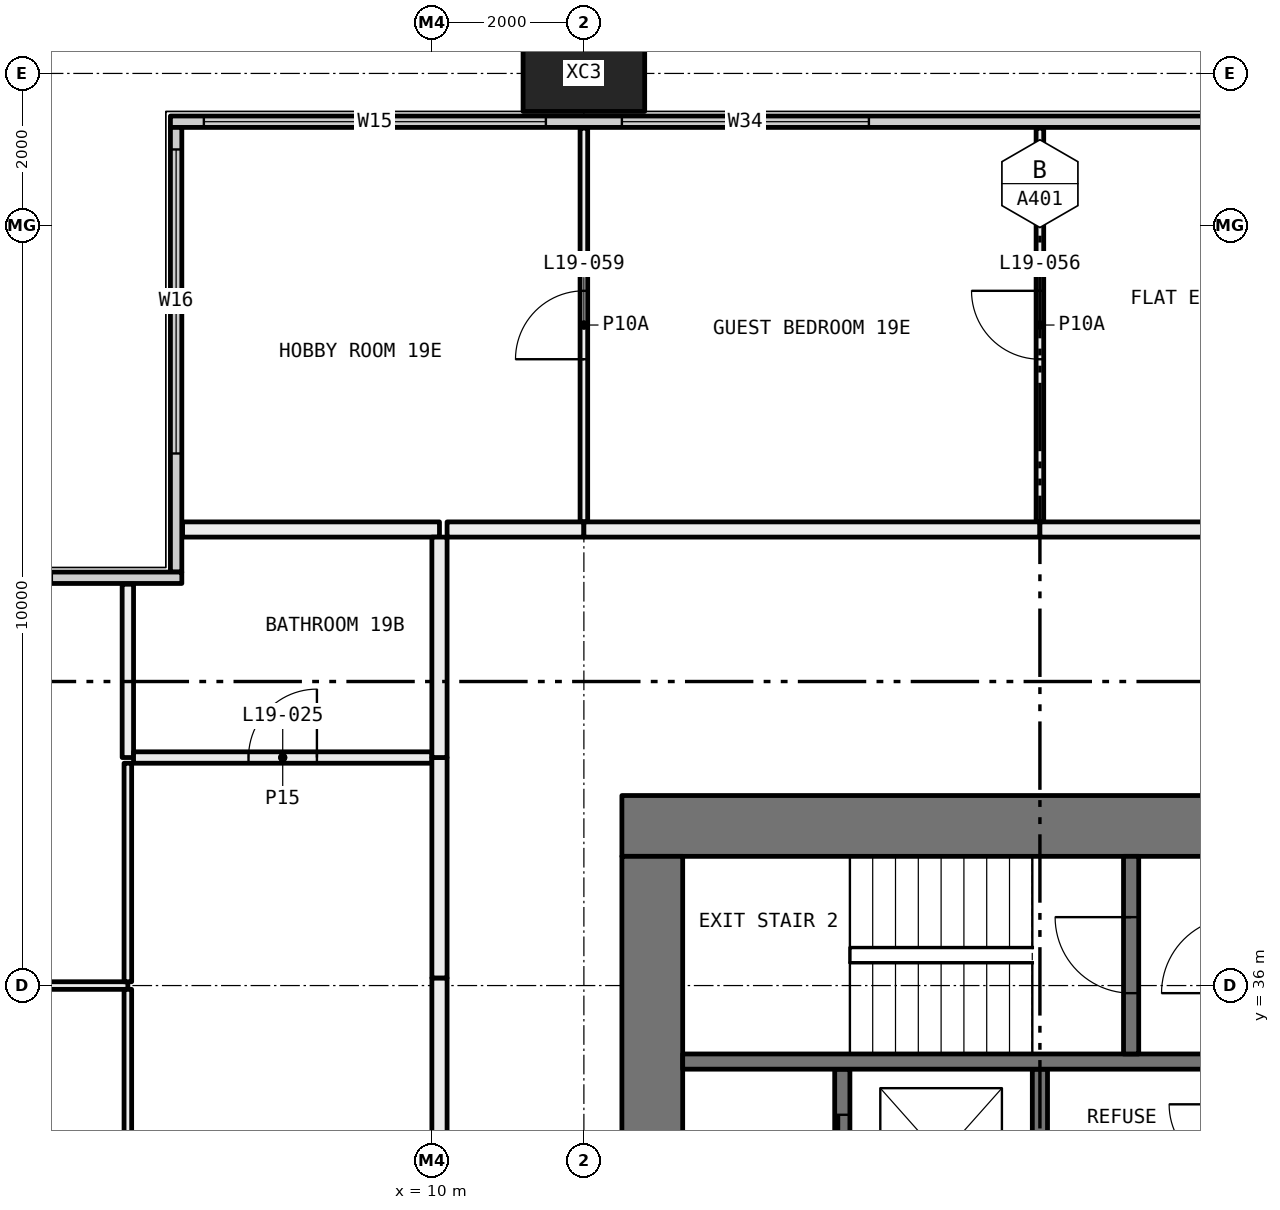
"""IFC4 building model, lengths in metres.
Left out: names, types, materials, properties, quantities, classifications, styles, units other than length and angle.
Written with IfcOpenShell. Run it as: python <this file> out.ifc"""

import sys

from ifc_helpers import new_model, si_unit, direction, frame, frame_2d, origin, origin_2d, place, context, subcontext, project, spatial, rectangle, hollow_rectangle, extrude, element, fill, save


model = new_model("IFC4")
c1 = context("Model", 3, precision=1e-05, world=origin(), true_north=direction((0.0, 1.0)))
c2 = subcontext(c1, "Body", "Model", "MODEL_VIEW")
j1 = project(units=[si_unit("LENGTHUNIT", "METRE"), si_unit("PLANEANGLEUNIT", "RADIAN")], contexts=[c1])
p1 = place(None, origin())
s1 = spatial("IfcSite", under=j1, at=p1, CompositionType="ELEMENT")
p2 = place(p1, origin())
s2 = spatial("IfcBuilding", under=s1, at=p2, CompositionType="ELEMENT")
p3 = place(p2, frame((0.0, 0.0, 78.3)))
s3 = spatial("IfcBuildingStorey", under=s2, at=p3, CompositionType="ELEMENT", Elevation=78.3)
p4 = place(p3, frame((12.0, 48.0, -0.4), z_axis=(0.0, 0.0, 1.0), x_axis=(1.0, 0.0, 0.0)))
e1 = element("IfcColumn", 1, at=p4, inside=s3, PredefinedType="COLUMN", context=c2, shape_type="SweptSolid", body=[
    extrude(hollow_rectangle(XDim=1.6, YDim=1.0, WallThickness=0.065, at=origin_2d()), origin(), (0.0, 0.0, 1.0), 3.45),
])
p5 = place(p3, frame((6.56, 47.365, 0.0), z_axis=(0.0, 0.0, 1.0), x_axis=(1.0, 0.0, 0.0)))
e2 = element("IfcWall", 2, at=p5, inside=s3, PredefinedType="ELEMENTEDWALL", context=c2, shape_type="SweptSolid", body=[
    extrude(rectangle(XDim=58.88, YDim=0.15, at=frame_2d((29.44, 0.0))), origin(), (0.0, 0.0, 1.0), 3.05),
])
p6 = place(p5, frame((0.44, 0.0, 0.45)))
e3 = element("IfcOpeningElement", 3, at=p6, cuts=e2, PredefinedType="OPENING", context=c2, shape_type="SweptSolid", body=[
    extrude(rectangle(XDim=4.5, YDim=2.55, at=frame_2d((2.25, 1.275))), frame((0.0, 0.085, 0.0), z_axis=(0.0, -1.0, 0.0), x_axis=(1.0, 0.0, 0.0)), (0.0, 0.0, 1.0), 0.17),
])
p7 = place(p5, frame((5.94, 0.0, 0.45)))
e4 = element("IfcOpeningElement", 4, at=p7, cuts=e2, PredefinedType="OPENING", context=c2, shape_type="SweptSolid", body=[
    extrude(rectangle(XDim=3.25, YDim=2.55, at=frame_2d((1.625, 1.275))), frame((0.0, 0.085, 0.0), z_axis=(0.0, -1.0, 0.0), x_axis=(1.0, 0.0, 0.0)), (0.0, 0.0, 1.0), 0.17),
])
p8 = place(p5, frame((13.69, 0.0, 0.45)))
e5 = element("IfcOpeningElement", 5, at=p8, cuts=e2, PredefinedType="OPENING", context=c2, shape_type="SweptSolid", body=[
    extrude(rectangle(XDim=3.25, YDim=2.55, at=frame_2d((1.625, 1.275))), frame((0.0, 0.085, 0.0), z_axis=(0.0, -1.0, 0.0), x_axis=(1.0, 0.0, 0.0)), (0.0, 0.0, 1.0), 0.17),
])
p9 = place(p5, frame((17.94, 0.0, 0.45)))
e6 = element("IfcOpeningElement", 6, at=p9, cuts=e2, PredefinedType="OPENING", context=c2, shape_type="SweptSolid", body=[
    extrude(rectangle(XDim=3.25, YDim=2.55, at=frame_2d((1.625, 1.275))), frame((0.0, 0.085, 0.0), z_axis=(0.0, -1.0, 0.0), x_axis=(1.0, 0.0, 0.0)), (0.0, 0.0, 1.0), 0.17),
])
p10 = place(p5, frame((26.94, 0.0, 0.45)))
e7 = element("IfcOpeningElement", 7, at=p10, cuts=e2, PredefinedType="OPENING", context=c2, shape_type="SweptSolid", body=[
    extrude(rectangle(XDim=2.0, YDim=2.55, at=frame_2d((1.0, 1.275))), frame((0.0, 0.085, 0.0), z_axis=(0.0, -1.0, 0.0), x_axis=(1.0, 0.0, 0.0)), (0.0, 0.0, 1.0), 0.17),
])
p11 = place(p5, frame((29.94, 0.0, 0.45)))
e8 = element("IfcOpeningElement", 8, at=p11, cuts=e2, PredefinedType="OPENING", context=c2, shape_type="SweptSolid", body=[
    extrude(rectangle(XDim=3.25, YDim=2.55, at=frame_2d((1.625, 1.275))), frame((0.0, 0.085, 0.0), z_axis=(0.0, -1.0, 0.0), x_axis=(1.0, 0.0, 0.0)), (0.0, 0.0, 1.0), 0.17),
])
p12 = place(p5, frame((37.69, 0.0, 0.45)))
e9 = element("IfcOpeningElement", 9, at=p12, cuts=e2, PredefinedType="OPENING", context=c2, shape_type="SweptSolid", body=[
    extrude(rectangle(XDim=3.25, YDim=2.55, at=frame_2d((1.625, 1.275))), frame((0.0, 0.085, 0.0), z_axis=(0.0, -1.0, 0.0), x_axis=(1.0, 0.0, 0.0)), (0.0, 0.0, 1.0), 0.17),
])
p13 = place(p5, frame((41.94, 0.0, 0.45)))
e10 = element("IfcOpeningElement", 10, at=p13, cuts=e2, PredefinedType="OPENING", context=c2, shape_type="SweptSolid", body=[
    extrude(rectangle(XDim=3.25, YDim=2.55, at=frame_2d((1.625, 1.275))), frame((0.0, 0.085, 0.0), z_axis=(0.0, -1.0, 0.0), x_axis=(1.0, 0.0, 0.0)), (0.0, 0.0, 1.0), 0.17),
])
p14 = place(p5, frame((50.94, 0.0, 0.45)))
e11 = element("IfcOpeningElement", 11, at=p14, cuts=e2, PredefinedType="OPENING", context=c2, shape_type="SweptSolid", body=[
    extrude(rectangle(XDim=2.0, YDim=2.55, at=frame_2d((1.0, 1.275))), frame((0.0, 0.085, 0.0), z_axis=(0.0, -1.0, 0.0), x_axis=(1.0, 0.0, 0.0)), (0.0, 0.0, 1.0), 0.17),
])
p15 = place(p5, frame((53.94, 0.0, 0.45)))
e12 = element("IfcOpeningElement", 12, at=p15, cuts=e2, PredefinedType="OPENING", context=c2, shape_type="SweptSolid", body=[
    extrude(rectangle(XDim=4.5, YDim=2.55, at=frame_2d((2.25, 1.275))), frame((0.0, 0.085, 0.0), z_axis=(0.0, -1.0, 0.0), x_axis=(1.0, 0.0, 0.0)), (0.0, 0.0, 1.0), 0.17),
])
p16 = place(p3, frame((6.635, 41.44, 0.0), z_axis=(0.0, 0.0, 1.0), x_axis=(0.0, 1.0, 0.0)))
e13 = element("IfcWall", 13, at=p16, inside=s3, PredefinedType="ELEMENTEDWALL", context=c2, shape_type="SweptSolid", body=[
    extrude(rectangle(XDim=5.85, YDim=0.15, at=frame_2d((2.925, 0.0))), origin(), (0.0, 0.0, 1.0), 3.05),
])
p17 = place(p16, frame((1.56, 0.0, 0.45)))
e14 = element("IfcOpeningElement", 14, at=p17, cuts=e13, PredefinedType="OPENING", context=c2, shape_type="SweptSolid", body=[
    extrude(rectangle(XDim=4.0, YDim=2.55, at=frame_2d((2.0, 1.275))), frame((0.0, 0.085, 0.0), z_axis=(0.0, -1.0, 0.0), x_axis=(1.0, 0.0, 0.0)), (0.0, 0.0, 1.0), 0.17),
])
p18 = place(p3, frame((0.56, 41.365, 0.0), z_axis=(0.0, 0.0, 1.0), x_axis=(1.0, 0.0, 0.0)))
e15 = element("IfcWall", 15, at=p18, inside=s3, PredefinedType="ELEMENTEDWALL", context=c2, shape_type="SweptSolid", body=[
    extrude(rectangle(XDim=6.15, YDim=0.15, at=frame_2d((3.075, 0.0))), origin(), (0.0, 0.0, 1.0), 3.05),
])
p19 = place(p18, frame((0.44, 0.0, 0.45)))
e16 = element("IfcOpeningElement", 16, at=p19, cuts=e15, PredefinedType="OPENING", context=c2, shape_type="SweptSolid", body=[
    extrude(rectangle(XDim=4.0, YDim=2.55, at=frame_2d((2.0, 1.275))), frame((0.0, 0.085, 0.0), z_axis=(0.0, -1.0, 0.0), x_axis=(1.0, 0.0, 0.0)), (0.0, 0.0, 1.0), 0.17),
])
p20 = place(p3, frame((6.0, 36.0, 0.0), z_axis=(0.0, 0.0, 1.0), x_axis=(-1.0, 0.0, 0.0)))
e17 = element("IfcWall", 17, at=p20, inside=s3, PredefinedType="PARTITIONING", context=c2, shape_type="SweptSolid", body=[
    extrude(rectangle(XDim=5.28, YDim=0.1, at=frame_2d((2.64, 0.0))), origin(), (0.0, 0.0, 1.0), 2.45),
])
p21 = place(p20, frame((2.19, 0.0, 0.0)))
e18 = element("IfcOpeningElement", 18, at=p21, cuts=e17, PredefinedType="OPENING", context=c2, shape_type="SweptSolid", body=[
    extrude(rectangle(XDim=0.9, YDim=2.1, at=frame_2d((0.45, 1.05))), frame((0.0, 0.06, 0.0), z_axis=(0.0, -1.0, 0.0), x_axis=(1.0, 0.0, 0.0)), (0.0, 0.0, 1.0), 0.12),
])
p22 = place(p3, frame((6.0, 25.5, 0.0), z_axis=(0.0, 0.0, 1.0), x_axis=(0.0, 1.0, 0.0)))
e19 = element("IfcWall", 19, at=p22, inside=s3, PredefinedType="PARTITIONING", context=c2, shape_type="SweptSolid", body=[
    extrude(rectangle(XDim=10.45, YDim=0.1, at=frame_2d((5.225, 0.0))), origin(), (0.0, 0.0, 1.0), 2.45),
])
p23 = place(p3, frame((6.0, 36.05, 0.0), z_axis=(0.0, 0.0, 1.0), x_axis=(0.0, 1.0, 0.0)))
e20 = element("IfcWall", 20, at=p23, inside=s3, PredefinedType="PARTITIONING", context=c2, shape_type="SweptSolid", body=[
    extrude(rectangle(XDim=2.875, YDim=0.1, at=frame_2d((1.438, 0.0))), origin(), (0.0, 0.0, 1.0), 2.45),
])
p24 = place(p3, frame((6.0, 39.0, 0.0), z_axis=(0.0, 0.0, 1.0), x_axis=(0.0, 1.0, 0.0)))
e21 = element("IfcWall", 21, at=p24, inside=s3, PredefinedType="PARTITIONING", context=c2, shape_type="SweptSolid", body=[
    extrude(rectangle(XDim=2.28, YDim=0.15, at=frame_2d((1.14, 0.0))), origin(), (0.0, 0.0, 1.0), 3.05),
])
p25 = place(p3, frame((10.0, 39.0, 0.0), z_axis=(0.0, 0.0, 1.0), x_axis=(-1.0, 0.0, 0.0)))
e22 = element("IfcWall", 22, at=p25, inside=s3, PredefinedType="PARTITIONING", context=c2, shape_type="SweptSolid", body=[
    extrude(rectangle(XDim=3.925, YDim=0.15, at=frame_2d((1.962, 0.0))), origin(), (0.0, 0.0, 1.0), 3.05),
])
p26 = place(p25, frame((1.512, 0.0, 0.0)))
e23 = element("IfcOpeningElement", 23, at=p26, cuts=e22, PredefinedType="OPENING", context=c2, shape_type="SweptSolid", body=[
    extrude(rectangle(XDim=0.9, YDim=2.1, at=frame_2d((0.45, 1.05))), frame((0.0, 0.085, 0.0), z_axis=(0.0, -1.0, 0.0), x_axis=(1.0, 0.0, 0.0)), (0.0, 0.0, 1.0), 0.17),
])
p27 = place(p3, frame((10.1, 25.5, 0.0), z_axis=(0.0, 0.0, 1.0), x_axis=(0.0, 1.0, 0.0)))
e24 = element("IfcWall", 24, at=p27, inside=s3, PredefinedType="PARTITIONING", context=c2, shape_type="SweptSolid", body=[
    extrude(rectangle(XDim=10.6, YDim=0.2, at=frame_2d((5.3, 0.0))), origin(), (0.0, 0.0, 1.0), 2.45),
])
p28 = place(p3, frame((10.1, 36.1, 0.0), z_axis=(0.0, 0.0, 1.0), x_axis=(0.0, 1.0, 0.0)))
e25 = element("IfcWall", 25, at=p28, inside=s3, PredefinedType="PARTITIONING", context=c2, shape_type="SweptSolid", body=[
    extrude(rectangle(XDim=2.9, YDim=0.2, at=frame_2d((1.45, 0.0))), origin(), (0.0, 0.0, 1.0), 3.05),
])
p29 = place(p3, frame((10.1, 42.0, 0.0), z_axis=(0.0, 0.0, 1.0), x_axis=(-1.0, 0.0, 0.0)))
e26 = element("IfcWall", 26, at=p29, inside=s3, PredefinedType="PARTITIONING", context=c2, shape_type="SweptSolid", body=[
    extrude(rectangle(XDim=3.38, YDim=0.2, at=frame_2d((1.69, 0.0))), origin(), (0.0, 0.0, 1.0), 3.05),
])
p30 = place(p3, frame((10.1, 39.0, 0.0), z_axis=(0.0, 0.0, 1.0), x_axis=(0.0, 1.0, 0.0)))
e27 = element("IfcWall", 27, at=p30, inside=s3, PredefinedType="PARTITIONING", context=c2, shape_type="SweptSolid", body=[
    extrude(rectangle(XDim=2.9, YDim=0.2, at=frame_2d((1.45, 0.0))), origin(), (0.0, 0.0, 1.0), 3.05),
])
p31 = place(p3, frame((12.0, 42.1, 0.0), z_axis=(0.0, 0.0, 1.0), x_axis=(0.0, 1.0, 0.0)))
e28 = element("IfcWall", 28, at=p31, inside=s3, PredefinedType="PARTITIONING", context=c2, shape_type="SweptSolid", body=[
    extrude(rectangle(XDim=5.18, YDim=0.1, at=frame_2d((2.59, 0.0))), origin(), (0.0, 0.0, 1.0), 3.05),
])
p32 = place(p31, frame((2.14, 0.0, 0.0)))
e29 = element("IfcOpeningElement", 29, at=p32, cuts=e28, PredefinedType="OPENING", context=c2, shape_type="SweptSolid", body=[
    extrude(rectangle(XDim=0.9, YDim=2.1, at=frame_2d((0.45, 1.05))), frame((0.0, 0.06, 0.0), z_axis=(0.0, -1.0, 0.0), x_axis=(1.0, 0.0, 0.0)), (0.0, 0.0, 1.0), 0.12),
])
p33 = place(p3, frame((10.2, 42.0, 0.0), z_axis=(0.0, 0.0, 1.0), x_axis=(1.0, 0.0, 0.0)))
e30 = element("IfcWall", 30, at=p33, inside=s3, PredefinedType="PARTITIONING", context=c2, shape_type="SweptSolid", body=[
    extrude(rectangle(XDim=1.8, YDim=0.2, at=frame_2d((0.9, 0.0))), origin(), (0.0, 0.0, 1.0), 3.05),
])
p34 = place(p3, frame((18.0, 42.1, 0.0), z_axis=(0.0, 0.0, 1.0), x_axis=(0.0, 1.0, 0.0)))
e31 = element("IfcWall", 31, at=p34, inside=s3, PredefinedType="PARTITIONING", context=c2, shape_type="SweptSolid", body=[
    extrude(rectangle(XDim=5.18, YDim=0.1, at=frame_2d((2.59, 0.0))), origin(), (0.0, 0.0, 1.0), 3.05),
])
p35 = place(p34, frame((2.14, 0.0, 0.0)))
e32 = element("IfcOpeningElement", 32, at=p35, cuts=e31, PredefinedType="OPENING", context=c2, shape_type="SweptSolid", body=[
    extrude(rectangle(XDim=0.9, YDim=2.1, at=frame_2d((0.45, 1.05))), frame((0.0, 0.06, 0.0), z_axis=(0.0, -1.0, 0.0), x_axis=(1.0, 0.0, 0.0)), (0.0, 0.0, 1.0), 0.12),
])
p36 = place(p3, frame((12.0, 42.0, 0.0), z_axis=(0.0, 0.0, 1.0), x_axis=(1.0, 0.0, 0.0)))
e33 = element("IfcWall", 33, at=p36, inside=s3, PredefinedType="PARTITIONING", context=c2, shape_type="SweptSolid", body=[
    extrude(rectangle(XDim=6.0, YDim=0.2, at=frame_2d((3.0, 0.0))), origin(), (0.0, 0.0, 1.0), 3.05),
])
p37 = place(p3, frame((18.0, 42.0, 0.0), z_axis=(0.0, 0.0, 1.0), x_axis=(1.0, 0.0, 0.0)))
e34 = element("IfcWall", 34, at=p37, inside=s3, PredefinedType="PARTITIONING", context=c2, shape_type="SweptSolid", body=[
    extrude(rectangle(XDim=6.0, YDim=0.2, at=frame_2d((3.0, 0.0))), origin(), (0.0, 0.0, 1.0), 3.05),
])
p38 = place(p37, frame((2.5, 0.0, 0.0)))
e35 = element("IfcOpeningElement", 35, at=p38, cuts=e34, PredefinedType="OPENING", context=c2, shape_type="SweptSolid", body=[
    extrude(rectangle(XDim=1.0, YDim=2.1, at=frame_2d((0.5, 1.05))), frame((0.0, 0.11, 0.0), z_axis=(0.0, -1.0, 0.0), x_axis=(1.0, 0.0, 0.0)), (0.0, 0.0, 1.0), 0.22),
])
p39 = place(p3, frame((12.5, 38.1, 0.0), z_axis=(0.0, 0.0, 1.0), x_axis=(1.0, 0.0, 0.0)))
e36 = element("IfcWall", 36, at=p39, inside=s3, PredefinedType="SHEAR", context=c2, shape_type="SweptSolid", body=[
    extrude(rectangle(XDim=11.0, YDim=0.8, at=frame_2d((5.5, 0.0))), origin(), (0.0, 0.0, 1.0), 3.05),
])
p40 = place(p39, frame((8.4, 0.0, 0.0)))
e37 = element("IfcOpeningElement", 37, at=p40, cuts=e36, PredefinedType="OPENING", context=c2, shape_type="SweptSolid", body=[
    extrude(rectangle(XDim=1.6, YDim=2.1, at=frame_2d((0.8, 1.05))), frame((0.0, 0.41, 0.0), z_axis=(0.0, -1.0, 0.0), x_axis=(1.0, 0.0, 0.0)), (0.0, 0.0, 1.0), 0.82),
])
p41 = place(p3, frame((12.9, 22.3, 0.0), z_axis=(0.0, 0.0, 1.0), x_axis=(0.0, 1.0, 0.0)))
e38 = element("IfcWall", 38, at=p41, inside=s3, PredefinedType="SHEAR", context=c2, shape_type="SweptSolid", body=[
    extrude(rectangle(XDim=15.4, YDim=0.8, at=frame_2d((7.7, 0.0))), origin(), (0.0, 0.0, 1.0), 3.05),
])
p42 = place(p41, frame((8.15, 0.0, 0.0)))
e39 = element("IfcOpeningElement", 39, at=p42, cuts=e38, PredefinedType="OPENING", context=c2, shape_type="SweptSolid", body=[
    extrude(rectangle(XDim=1.6, YDim=2.1, at=frame_2d((0.8, 1.05))), frame((0.0, 0.41, 0.0), z_axis=(0.0, -1.0, 0.0), x_axis=(1.0, 0.0, 0.0)), (0.0, 0.0, 1.0), 0.82),
])
p43 = place(p41, frame((2.05, 0.0, 0.0)))
e40 = element("IfcOpeningElement", 40, at=p43, cuts=e38, PredefinedType="OPENING", context=c2, shape_type="SweptSolid", body=[
    extrude(rectangle(XDim=1.0, YDim=2.1, at=frame_2d((0.5, 1.05))), frame((0.0, 0.41, 0.0), z_axis=(0.0, -1.0, 0.0), x_axis=(1.0, 0.0, 0.0)), (0.0, 0.0, 1.0), 0.82),
])
p44 = place(p3, frame((15.4, 22.3, 0.0), z_axis=(0.0, 0.0, 1.0), x_axis=(0.0, 1.0, 0.0)))
e41 = element("IfcWall", 41, at=p44, inside=s3, PredefinedType="SOLIDWALL", context=c2, shape_type="SweptSolid", body=[
    extrude(rectangle(XDim=12.6, YDim=0.2, at=frame_2d((6.3, 0.0))), origin(), (0.0, 0.0, 1.0), 3.05),
])
p45 = place(p44, frame((3.4, 0.0, 0.0)))
e42 = element("IfcOpeningElement", 42, at=p45, cuts=e41, PredefinedType="OPENING", context=c2, shape_type="SweptSolid", body=[
    extrude(rectangle(XDim=1.1, YDim=2.1, at=frame_2d((0.55, 1.05))), frame((0.0, 0.11, 0.0), z_axis=(0.0, -1.0, 0.0), x_axis=(1.0, 0.0, 0.0)), (0.0, 0.0, 1.0), 0.22),
])
p46 = place(p44, frame((5.9, 0.0, 0.0)))
e43 = element("IfcOpeningElement", 43, at=p46, cuts=e41, PredefinedType="OPENING", context=c2, shape_type="SweptSolid", body=[
    extrude(rectangle(XDim=1.1, YDim=2.1, at=frame_2d((0.55, 1.05))), frame((0.0, 0.11, 0.0), z_axis=(0.0, -1.0, 0.0), x_axis=(1.0, 0.0, 0.0)), (0.0, 0.0, 1.0), 0.22),
])
p47 = place(p44, frame((8.4, 0.0, 0.0)))
e44 = element("IfcOpeningElement", 44, at=p47, cuts=e41, PredefinedType="OPENING", context=c2, shape_type="SweptSolid", body=[
    extrude(rectangle(XDim=1.1, YDim=2.1, at=frame_2d((0.55, 1.05))), frame((0.0, 0.11, 0.0), z_axis=(0.0, -1.0, 0.0), x_axis=(1.0, 0.0, 0.0)), (0.0, 0.0, 1.0), 0.22),
])
p48 = place(p44, frame((10.9, 0.0, 0.0)))
e45 = element("IfcOpeningElement", 45, at=p48, cuts=e41, PredefinedType="OPENING", context=c2, shape_type="SweptSolid", body=[
    extrude(rectangle(XDim=1.1, YDim=2.1, at=frame_2d((0.55, 1.05))), frame((0.0, 0.11, 0.0), z_axis=(0.0, -1.0, 0.0), x_axis=(1.0, 0.0, 0.0)), (0.0, 0.0, 1.0), 0.22),
])
p49 = place(p44, frame((0.15, 0.0, 0.0)))
e46 = element("IfcOpeningElement", 46, at=p49, cuts=e41, PredefinedType="OPENING", context=c2, shape_type="SweptSolid", body=[
    extrude(rectangle(XDim=1.0, YDim=2.1, at=frame_2d((0.5, 1.05))), frame((0.0, 0.11, 0.0), z_axis=(0.0, -1.0, 0.0), x_axis=(1.0, 0.0, 0.0)), (0.0, 0.0, 1.0), 0.22),
])
p50 = place(p3, frame((18.0, 25.1, 0.0), z_axis=(0.0, 0.0, 1.0), x_axis=(0.0, 1.0, 0.0)))
e47 = element("IfcWall", 47, at=p50, inside=s3, PredefinedType="SOLIDWALL", context=c2, shape_type="SweptSolid", body=[
    extrude(rectangle(XDim=9.8, YDim=0.2, at=frame_2d((4.9, 0.0))), origin(), (0.0, 0.0, 1.0), 3.05),
])
p51 = place(p3, frame((13.3, 35.0, 0.0), z_axis=(0.0, 0.0, 1.0), x_axis=(1.0, 0.0, 0.0)))
e48 = element("IfcWall", 48, at=p51, inside=s3, PredefinedType="SOLIDWALL", context=c2, shape_type="SweptSolid", body=[
    extrude(rectangle(XDim=7.2, YDim=0.2, at=frame_2d((3.6, 0.0))), origin(), (0.0, 0.0, 1.0), 3.05),
])
p52 = place(p3, frame((19.2, 35.1, 0.0), z_axis=(0.0, 0.0, 1.0), x_axis=(0.0, 1.0, 0.0)))
e49 = element("IfcWall", 49, at=p52, inside=s3, PredefinedType="SOLIDWALL", context=c2, shape_type="SweptSolid", body=[
    extrude(rectangle(XDim=2.6, YDim=0.2, at=frame_2d((1.3, 0.0))), origin(), (0.0, 0.0, 1.0), 3.05),
])
p53 = place(p52, frame((0.8, 0.0, 0.0)))
e50 = element("IfcOpeningElement", 50, at=p53, cuts=e49, PredefinedType="OPENING", context=c2, shape_type="SweptSolid", body=[
    extrude(rectangle(XDim=1.0, YDim=2.1, at=frame_2d((0.5, 1.05))), frame((0.0, 0.11, 0.0), z_axis=(0.0, -1.0, 0.0), x_axis=(1.0, 0.0, 0.0)), (0.0, 0.0, 1.0), 0.22),
])
p54 = place(p6, origin())
e51 = element("IfcWindow", 51, at=p54, inside=s3, PartitioningType="SINGLE_PANEL", PredefinedType="WINDOW", context=c2, shape_type="SweptSolid", body=[
    extrude(rectangle(XDim=4.5, YDim=2.55, at=frame_2d((2.25, 1.275))), frame((0.0, 0.03, 0.0), z_axis=(0.0, -1.0, 0.0), x_axis=(1.0, 0.0, 0.0)), (0.0, 0.0, 1.0), 0.06),
])
fill(e3, e51)
p55 = place(p7, origin())
e52 = element("IfcWindow", 52, at=p55, inside=s3, PartitioningType="SINGLE_PANEL", PredefinedType="WINDOW", context=c2, shape_type="SweptSolid", body=[
    extrude(rectangle(XDim=3.25, YDim=2.55, at=frame_2d((1.625, 1.275))), frame((0.0, 0.03, 0.0), z_axis=(0.0, -1.0, 0.0), x_axis=(1.0, 0.0, 0.0)), (0.0, 0.0, 1.0), 0.06),
])
fill(e4, e52)
p56 = place(p17, origin())
e53 = element("IfcWindow", 53, at=p56, inside=s3, PartitioningType="SINGLE_PANEL", PredefinedType="WINDOW", context=c2, shape_type="SweptSolid", body=[
    extrude(rectangle(XDim=4.0, YDim=2.55, at=frame_2d((2.0, 1.275))), frame((0.0, 0.03, 0.0), z_axis=(0.0, -1.0, 0.0), x_axis=(1.0, 0.0, 0.0)), (0.0, 0.0, 1.0), 0.06),
])
fill(e14, e53)
p57 = place(p26, frame((0.9, 0.0, 0.0), x_axis=(-1.0, 0.0, 0.0)))
e54 = element("IfcDoor", 54, at=p57, inside=s3, OperationType="SINGLE_SWING_LEFT", PredefinedType="DOOR", context=c2, shape_type="SweptSolid", body=[
    extrude(rectangle(XDim=0.9, YDim=2.1, at=frame_2d((0.45, 1.05))), frame((0.0, 0.025, 0.0), z_axis=(0.0, -1.0, 0.0), x_axis=(1.0, 0.0, 0.0)), (0.0, 0.0, 1.0), 0.05),
])
fill(e23, e54)
p58 = place(p35, origin())
e55 = element("IfcDoor", 55, at=p58, inside=s3, OperationType="SINGLE_SWING_LEFT", PredefinedType="DOOR", context=c2, shape_type="SweptSolid", body=[
    extrude(rectangle(XDim=0.9, YDim=2.1, at=frame_2d((0.45, 1.05))), frame((0.0, 0.025, 0.0), z_axis=(0.0, -1.0, 0.0), x_axis=(1.0, 0.0, 0.0)), (0.0, 0.0, 1.0), 0.05),
])
fill(e32, e55)
p59 = place(p32, origin())
e56 = element("IfcDoor", 56, at=p59, inside=s3, OperationType="SINGLE_SWING_RIGHT", PredefinedType="DOOR", context=c2, shape_type="SweptSolid", body=[
    extrude(rectangle(XDim=0.9, YDim=2.1, at=frame_2d((0.45, 1.05))), frame((0.0, 0.025, 0.0), z_axis=(0.0, -1.0, 0.0), x_axis=(1.0, 0.0, 0.0)), (0.0, 0.0, 1.0), 0.05),
])
fill(e29, e56)
p60 = place(p48, origin())
e57 = element("IfcDoor", 57, at=p60, inside=s3, OperationType="SLIDING_TO_LEFT", PredefinedType="DOOR", context=c2, shape_type="SweptSolid", body=[
    extrude(rectangle(XDim=1.1, YDim=2.1, at=frame_2d((0.55, 1.05))), frame((0.0, 0.025, 0.0), z_axis=(0.0, -1.0, 0.0), x_axis=(1.0, 0.0, 0.0)), (0.0, 0.0, 1.0), 0.05),
])
fill(e45, e57)
p61 = place(p53, origin())
e58 = element("IfcDoor", 58, at=p61, inside=s3, OperationType="SINGLE_SWING_LEFT", PredefinedType="DOOR", context=c2, shape_type="SweptSolid", body=[
    extrude(rectangle(XDim=1.0, YDim=2.1, at=frame_2d((0.5, 1.05))), frame((0.0, 0.025, 0.0), z_axis=(0.0, -1.0, 0.0), x_axis=(1.0, 0.0, 0.0)), (0.0, 0.0, 1.0), 0.05),
])
fill(e50, e58)
save(model, sys.argv[1])
